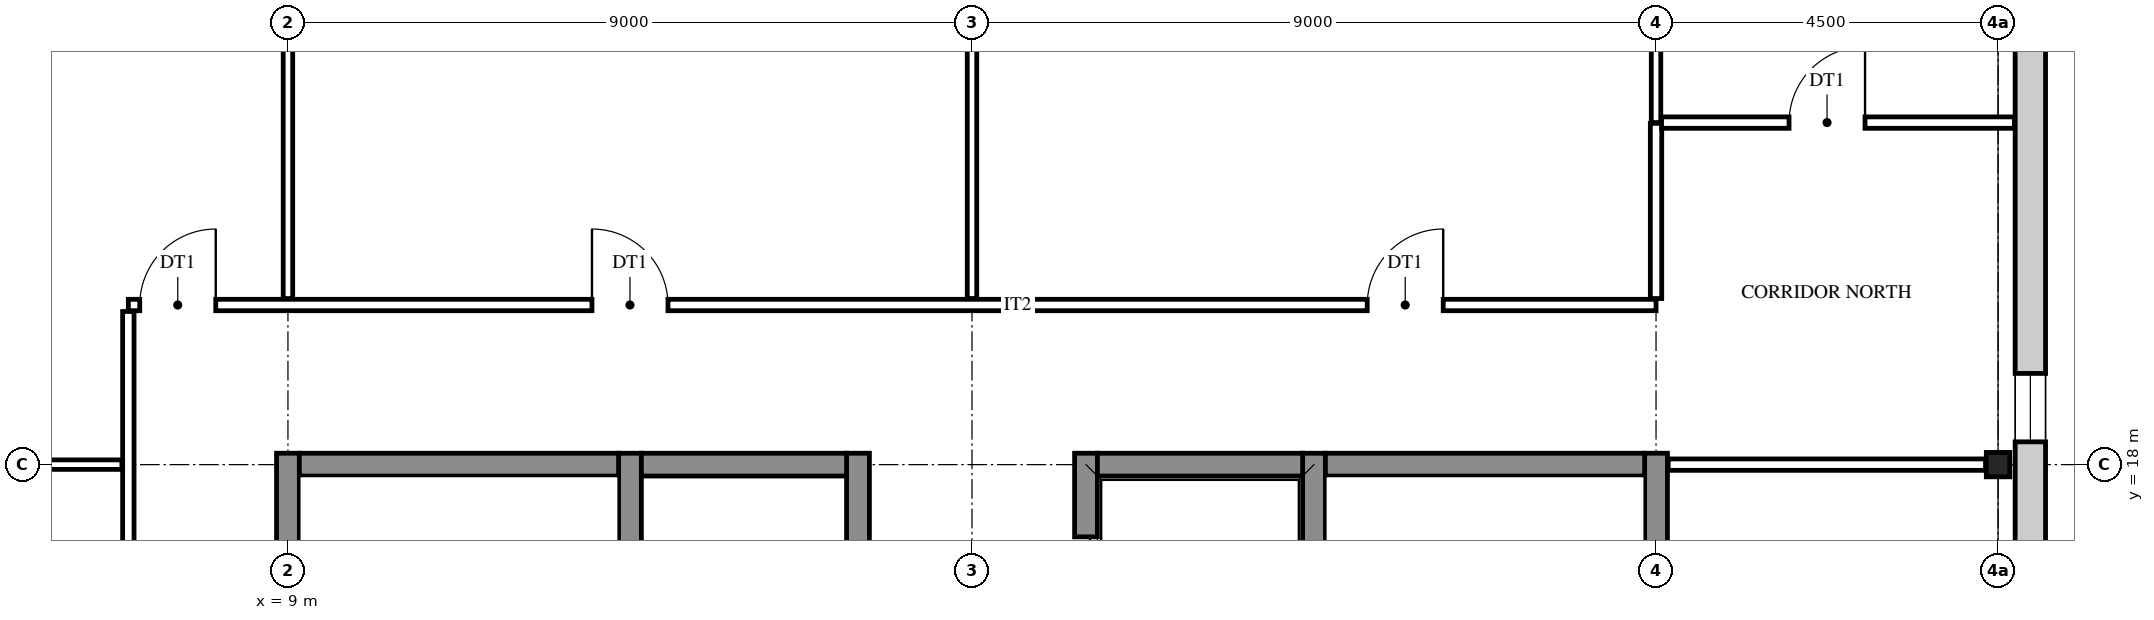
"""IFC4 building model, lengths in metres.
Left out: names, types, materials, properties, quantities, classifications, styles, units other than length and angle.
Written with IfcOpenShell. Run it as: python <this file> out.ifc"""

import sys

from ifc_helpers import new_model, si_unit, direction, frame, frame_2d, origin, origin_2d, place, context, subcontext, project, spatial, rectangle, i_section, extrude, element, fill, save


model = new_model("IFC4")
c1 = context("Model", 3, precision=1e-05, world=origin(), true_north=direction((0.0, 1.0)))
c2 = subcontext(c1, "Body", "Model", "MODEL_VIEW")
j1 = project(units=[si_unit("LENGTHUNIT", "METRE"), si_unit("PLANEANGLEUNIT", "RADIAN")], contexts=[c1])
p1 = place(None, origin())
s1 = spatial("IfcSite", under=j1, at=p1, CompositionType="ELEMENT")
p2 = place(p1, origin())
s2 = spatial("IfcBuilding", under=s1, at=p2, CompositionType="ELEMENT")
p3 = place(p2, frame((0.0, 0.0, 48.6)))
s3 = spatial("IfcBuildingStorey", under=s2, at=p3, CompositionType="ELEMENT", Elevation=48.6)
p4 = place(p3, frame((31.5, 18.0, 0.0), z_axis=(0.0, 0.0, 1.0), x_axis=(1.0, 0.0, 0.0)))
e1 = element("IfcColumn", 1, at=p4, inside=s3, PredefinedType="COLUMN", context=c2, shape_type="SweptSolid", body=[
    extrude(i_section(OverallWidth=0.309, OverallDepth=0.321, WebThickness=0.014, FlangeThickness=0.022, FilletRadius=0.017, at=origin_2d()), origin(), (0.0, 0.0, 1.0), 4.2),
])
for number, where, z_axis, x_axis in (
    (2, (9.0, 8.85, 0.0), (0.0, 0.0, 1.0), (0.0, 1.0, 0.0)),
    (3, (13.5, 8.85, 0.0), (0.0, 0.0, 1.0), (0.0, 1.0, 0.0)),
):
    element("IfcWall", number, at=place(p3, frame(where, z_axis=z_axis, x_axis=x_axis)), inside=s3, PredefinedType="SHEAR", context=c2, shape_type="SweptSolid", body=[
        extrude(rectangle(XDim=9.3, YDim=0.3, at=frame_2d((4.65, 0.0))), origin(), (0.0, 0.0, 1.0), 4.2),
    ])
p5 = place(p3, frame((16.5, 8.85, 0.0), z_axis=(0.0, 0.0, 1.0), x_axis=(0.0, 1.0, 0.0)))
e4 = element("IfcWall", 4, at=p5, inside=s3, PredefinedType="SHEAR", context=c2, shape_type="SweptSolid", body=[
    extrude(rectangle(XDim=9.3, YDim=0.3, at=frame_2d((4.65, 0.0))), origin(), (0.0, 0.0, 1.0), 4.2),
])
p6 = place(p5, frame((1.1, 0.0, 0.0)))
e5 = element("IfcOpeningElement", 5, at=p6, cuts=e4, PredefinedType="OPENING", context=c2, shape_type="SweptSolid", body=[
    extrude(rectangle(XDim=1.1, YDim=2.1, at=frame_2d((0.55, 1.05))), frame((0.0, 0.16, 0.0), z_axis=(0.0, -1.0, 0.0), x_axis=(1.0, 0.0, 0.0)), (0.0, 0.0, 1.0), 0.32),
])
p7 = place(p5, frame((4.1, 0.0, 0.0)))
e6 = element("IfcOpeningElement", 6, at=p7, cuts=e4, PredefinedType="OPENING", context=c2, shape_type="SweptSolid", body=[
    extrude(rectangle(XDim=1.1, YDim=2.1, at=frame_2d((0.55, 1.05))), frame((0.0, 0.16, 0.0), z_axis=(0.0, -1.0, 0.0), x_axis=(1.0, 0.0, 0.0)), (0.0, 0.0, 1.0), 0.32),
])
p8 = place(p3, frame((19.5, 8.85, 0.0), z_axis=(0.0, 0.0, 1.0), x_axis=(0.0, 1.0, 0.0)))
e7 = element("IfcWall", 7, at=p8, inside=s3, PredefinedType="SHEAR", context=c2, shape_type="SweptSolid", body=[
    extrude(rectangle(XDim=9.3, YDim=0.3, at=frame_2d((4.65, 0.0))), origin(), (0.0, 0.0, 1.0), 4.2),
])
p9 = place(p8, frame((3.95, 0.0, 0.0)))
e8 = element("IfcOpeningElement", 8, at=p9, cuts=e7, PredefinedType="OPENING", context=c2, shape_type="SweptSolid", body=[
    extrude(rectangle(XDim=1.4, YDim=2.1, at=frame_2d((0.7, 1.05))), frame((0.0, 0.16, 0.0), z_axis=(0.0, -1.0, 0.0), x_axis=(1.0, 0.0, 0.0)), (0.0, 0.0, 1.0), 0.32),
])
p10 = place(p8, frame((7.1, 0.0, 0.0)))
e9 = element("IfcOpeningElement", 9, at=p10, cuts=e7, PredefinedType="OPENING", context=c2, shape_type="SweptSolid", body=[
    extrude(rectangle(XDim=1.1, YDim=2.1, at=frame_2d((0.55, 1.05))), frame((0.0, 0.16, 0.0), z_axis=(0.0, -1.0, 0.0), x_axis=(1.0, 0.0, 0.0)), (0.0, 0.0, 1.0), 0.32),
])
for number, where, z_axis, x_axis in (
    (10, (22.5, 8.85, 0.0), (0.0, 0.0, 1.0), (0.0, 1.0, 0.0)),
    (11, (27.0, 8.85, 0.0), (0.0, 0.0, 1.0), (0.0, 1.0, 0.0)),
):
    element("IfcWall", number, at=place(p3, frame(where, z_axis=z_axis, x_axis=x_axis)), inside=s3, PredefinedType="SHEAR", context=c2, shape_type="SweptSolid", body=[
        extrude(rectangle(XDim=9.3, YDim=0.3, at=frame_2d((4.65, 0.0))), origin(), (0.0, 0.0, 1.0), 4.2),
    ])
p11 = place(p3, frame((9.15, 18.0, 0.0), z_axis=(0.0, 0.0, 1.0), x_axis=(1.0, 0.0, 0.0)))
e12 = element("IfcWall", 12, at=p11, inside=s3, PredefinedType="SHEAR", context=c2, shape_type="SweptSolid", body=[
    extrude(rectangle(XDim=4.2, YDim=0.3, at=frame_2d((2.1, 0.0))), origin(), (0.0, 0.0, 1.0), 4.2),
])
for number, where, z_axis, x_axis in (
    (13, (13.65, 18.0, 0.0), (0.0, 0.0, 1.0), (1.0, 0.0, 0.0)),
    (14, (19.65, 18.0, 0.0), (0.0, 0.0, 1.0), (1.0, 0.0, 0.0)),
):
    element("IfcWall", number, at=place(p3, frame(where, z_axis=z_axis, x_axis=x_axis)), inside=s3, PredefinedType="SHEAR", context=c2, shape_type="SweptSolid", body=[
        extrude(rectangle(XDim=2.7, YDim=0.3, at=frame_2d((1.35, 0.0))), origin(), (0.0, 0.0, 1.0), 4.2),
    ])
p12 = place(p3, frame((22.65, 18.0, 0.0), z_axis=(0.0, 0.0, 1.0), x_axis=(1.0, 0.0, 0.0)))
e15 = element("IfcWall", 15, at=p12, inside=s3, PredefinedType="SHEAR", context=c2, shape_type="SweptSolid", body=[
    extrude(rectangle(XDim=4.2, YDim=0.3, at=frame_2d((2.1, 0.0))), origin(), (0.0, 0.0, 1.0), 4.2),
])
p13 = place(p3, frame((31.925, 27.225, 0.0), z_axis=(0.0, 0.0, 1.0), x_axis=(0.0, -1.0, 0.0)))
e16 = element("IfcWall", 16, at=p13, inside=s3, PredefinedType="STANDARD", context=c2, shape_type="SweptSolid", body=[
    extrude(rectangle(XDim=27.45, YDim=0.4, at=frame_2d((13.725, 0.0))), origin(), (0.0, 0.0, 1.0), 4.2),
])
p14 = place(p13, frame((26.025, 0.0, 0.9)))
e17 = element("IfcOpeningElement", 17, at=p14, cuts=e16, PredefinedType="OPENING", context=c2, shape_type="SweptSolid", body=[
    extrude(rectangle(XDim=0.9, YDim=2.0, at=frame_2d((0.45, 1.0))), frame((0.0, 0.21, 0.0), z_axis=(0.0, -1.0, 0.0), x_axis=(1.0, 0.0, 0.0)), (0.0, 0.0, 1.0), 0.42),
])
p15 = place(p13, frame((18.525, 0.0, 0.9)))
e18 = element("IfcOpeningElement", 18, at=p15, cuts=e16, PredefinedType="OPENING", context=c2, shape_type="SweptSolid", body=[
    extrude(rectangle(XDim=0.9, YDim=2.0, at=frame_2d((0.45, 1.0))), frame((0.0, 0.21, 0.0), z_axis=(0.0, -1.0, 0.0), x_axis=(1.0, 0.0, 0.0)), (0.0, 0.0, 1.0), 0.42),
])
p16 = place(p13, frame((15.675, 0.0, 1.6)))
e19 = element("IfcOpeningElement", 19, at=p16, cuts=e16, PredefinedType="OPENING", context=c2, shape_type="SweptSolid", body=[
    extrude(rectangle(XDim=0.6, YDim=0.9, at=frame_2d((0.3, 0.45))), frame((0.0, 0.21, 0.0), z_axis=(0.0, -1.0, 0.0), x_axis=(1.0, 0.0, 0.0)), (0.0, 0.0, 1.0), 0.42),
])
p17 = place(p13, frame((11.175, 0.0, 1.6)))
e20 = element("IfcOpeningElement", 20, at=p17, cuts=e16, PredefinedType="OPENING", context=c2, shape_type="SweptSolid", body=[
    extrude(rectangle(XDim=0.6, YDim=0.9, at=frame_2d((0.3, 0.45))), frame((0.0, 0.21, 0.0), z_axis=(0.0, -1.0, 0.0), x_axis=(1.0, 0.0, 0.0)), (0.0, 0.0, 1.0), 0.42),
])
p18 = place(p13, frame((8.025, 0.0, 0.9)))
e21 = element("IfcOpeningElement", 21, at=p18, cuts=e16, PredefinedType="OPENING", context=c2, shape_type="SweptSolid", body=[
    extrude(rectangle(XDim=0.9, YDim=2.0, at=frame_2d((0.45, 1.0))), frame((0.0, 0.21, 0.0), z_axis=(0.0, -1.0, 0.0), x_axis=(1.0, 0.0, 0.0)), (0.0, 0.0, 1.0), 0.42),
])
p19 = place(p13, frame((0.525, 0.0, 0.9)))
e22 = element("IfcOpeningElement", 22, at=p19, cuts=e16, PredefinedType="OPENING", context=c2, shape_type="SweptSolid", body=[
    extrude(rectangle(XDim=0.9, YDim=2.0, at=frame_2d((0.45, 1.0))), frame((0.0, 0.21, 0.0), z_axis=(0.0, -1.0, 0.0), x_axis=(1.0, 0.0, 0.0)), (0.0, 0.0, 1.0), 0.42),
])
p20 = place(p3, frame((6.9, 6.985, 0.0), z_axis=(0.0, 0.0, 1.0), x_axis=(0.0, 1.0, 0.0)))
e23 = element("IfcWall", 23, at=p20, inside=s3, PredefinedType="PARTITIONING", context=c2, shape_type="SweptSolid", body=[
    extrude(rectangle(XDim=13.03, YDim=0.15, at=frame_2d((6.515, 0.0))), origin(), (0.0, 0.0, 1.0), 3.542),
])
p21 = place(p20, frame((5.965, 0.0, 0.0)))
e24 = element("IfcOpeningElement", 24, at=p21, cuts=e23, PredefinedType="OPENING", context=c2, shape_type="SweptSolid", body=[
    extrude(rectangle(XDim=1.1, YDim=2.1, at=frame_2d((0.55, 1.05))), frame((0.0, 0.085, 0.0), z_axis=(0.0, -1.0, 0.0), x_axis=(1.0, 0.0, 0.0)), (0.0, 0.0, 1.0), 0.17),
])
for number, where, z_axis, x_axis in (
    (25, (9.0, 20.185, 0.0), (0.0, 0.0, 1.0), (0.0, 1.0, 0.0)),
    (26, (18.0, 20.185, 0.0), (0.0, 0.0, 1.0), (0.0, 1.0, 0.0)),
):
    element("IfcWall", number, at=place(p3, frame(where, z_axis=z_axis, x_axis=x_axis)), inside=s3, PredefinedType="PARTITIONING", context=c2, shape_type="SweptSolid", body=[
        extrude(rectangle(XDim=6.645, YDim=0.125, at=frame_2d((3.322, 0.0))), origin(), (0.0, 0.0, 1.0), 3.542),
    ])
p22 = place(p3, frame((27.0, 20.185, 0.0), z_axis=(0.0, 0.0, 1.0), x_axis=(0.0, 1.0, 0.0)))
e27 = element("IfcWall", 27, at=p22, inside=s3, PredefinedType="PARTITIONING", context=c2, shape_type="SweptSolid", body=[
    extrude(rectangle(XDim=2.305, YDim=0.15, at=frame_2d((1.152, 0.0))), origin(), (0.0, 0.0, 1.0), 3.542),
])
p23 = place(p3, frame((27.0, 22.5, 0.0), z_axis=(0.0, 0.0, 1.0), x_axis=(0.0, 1.0, 0.0)))
e28 = element("IfcWall", 28, at=p23, inside=s3, PredefinedType="PARTITIONING", context=c2, shape_type="SweptSolid", body=[
    extrude(rectangle(XDim=4.33, YDim=0.125, at=frame_2d((2.165, 0.0))), origin(), (0.0, 0.0, 1.0), 3.542),
])
p24 = place(p3, frame((0.165, 18.0, 0.0), z_axis=(0.0, 0.0, 1.0), x_axis=(1.0, 0.0, 0.0)))
e29 = element("IfcWall", 29, at=p24, inside=s3, PredefinedType="PARTITIONING", context=c2, shape_type="SweptSolid", body=[
    extrude(rectangle(XDim=6.65, YDim=0.125, at=frame_2d((3.325, 0.0))), origin(), (0.0, 0.0, 1.0), 3.542),
])
p25 = place(p3, frame((27.16, 18.0, 0.0), z_axis=(0.0, 0.0, 1.0), x_axis=(1.0, 0.0, 0.0)))
e30 = element("IfcWall", 30, at=p25, inside=s3, PredefinedType="PARTITIONING", context=c2, shape_type="SweptSolid", body=[
    extrude(rectangle(XDim=4.176, YDim=0.15, at=frame_2d((2.088, 0.0))), origin(), (0.0, 0.0, 1.0), 3.542),
])
p26 = place(p3, frame((6.9, 20.1, 0.0), z_axis=(0.0, 0.0, 1.0), x_axis=(1.0, 0.0, 0.0)))
e31 = element("IfcWall", 31, at=p26, inside=s3, PredefinedType="PARTITIONING", context=c2, shape_type="SweptSolid", body=[
    extrude(rectangle(XDim=20.1, YDim=0.15, at=frame_2d((10.05, 0.0))), origin(), (0.0, 0.0, 1.0), 3.542),
])
p27 = place(p26, frame((0.15, 0.0, 0.0)))
e32 = element("IfcOpeningElement", 32, at=p27, cuts=e31, PredefinedType="OPENING", context=c2, shape_type="SweptSolid", body=[
    extrude(rectangle(XDim=1.0, YDim=2.1, at=frame_2d((0.5, 1.05))), frame((0.0, 0.085, 0.0), z_axis=(0.0, -1.0, 0.0), x_axis=(1.0, 0.0, 0.0)), (0.0, 0.0, 1.0), 0.17),
])
p28 = place(p26, frame((6.1, 0.0, 0.0)))
e33 = element("IfcOpeningElement", 33, at=p28, cuts=e31, PredefinedType="OPENING", context=c2, shape_type="SweptSolid", body=[
    extrude(rectangle(XDim=1.0, YDim=2.1, at=frame_2d((0.5, 1.05))), frame((0.0, 0.085, 0.0), z_axis=(0.0, -1.0, 0.0), x_axis=(1.0, 0.0, 0.0)), (0.0, 0.0, 1.0), 0.17),
])
p29 = place(p26, frame((16.3, 0.0, 0.0)))
e34 = element("IfcOpeningElement", 34, at=p29, cuts=e31, PredefinedType="OPENING", context=c2, shape_type="SweptSolid", body=[
    extrude(rectangle(XDim=1.0, YDim=2.1, at=frame_2d((0.5, 1.05))), frame((0.0, 0.085, 0.0), z_axis=(0.0, -1.0, 0.0), x_axis=(1.0, 0.0, 0.0)), (0.0, 0.0, 1.0), 0.17),
])
p30 = place(p3, frame((27.073, 22.5, 0.0), z_axis=(0.0, 0.0, 1.0), x_axis=(1.0, 0.0, 0.0)))
e35 = element("IfcWall", 35, at=p30, inside=s3, PredefinedType="PARTITIONING", context=c2, shape_type="SweptSolid", body=[
    extrude(rectangle(XDim=4.643, YDim=0.15, at=frame_2d((2.321, 0.0))), origin(), (0.0, 0.0, 1.0), 3.542),
])
p31 = place(p30, frame((1.677, 0.0, 0.0)))
e36 = element("IfcOpeningElement", 36, at=p31, cuts=e35, PredefinedType="OPENING", context=c2, shape_type="SweptSolid", body=[
    extrude(rectangle(XDim=1.0, YDim=2.1, at=frame_2d((0.5, 1.05))), frame((0.0, 0.085, 0.0), z_axis=(0.0, -1.0, 0.0), x_axis=(1.0, 0.0, 0.0)), (0.0, 0.0, 1.0), 0.17),
])
p32 = place(p18, origin())
e37 = element("IfcWindow", 37, at=p32, inside=s3, PartitioningType="SINGLE_PANEL", PredefinedType="WINDOW", context=c2, shape_type="SweptSolid", body=[
    extrude(rectangle(XDim=0.9, YDim=2.0, at=frame_2d((0.45, 1.0))), frame((0.0, 0.03, 0.0), z_axis=(0.0, -1.0, 0.0), x_axis=(1.0, 0.0, 0.0)), (0.0, 0.0, 1.0), 0.06),
])
fill(e21, e37)
p33 = place(p27, origin())
e38 = element("IfcDoor", 38, at=p33, inside=s3, OperationType="SINGLE_SWING_RIGHT", PredefinedType="DOOR", context=c2, shape_type="SweptSolid", body=[
    extrude(rectangle(XDim=1.0, YDim=2.1, at=frame_2d((0.5, 1.05))), frame((0.0, 0.025, 0.0), z_axis=(0.0, -1.0, 0.0), x_axis=(1.0, 0.0, 0.0)), (0.0, 0.0, 1.0), 0.05),
])
fill(e32, e38)
p34 = place(p28, origin())
e39 = element("IfcDoor", 39, at=p34, inside=s3, OperationType="SINGLE_SWING_LEFT", PredefinedType="DOOR", context=c2, shape_type="SweptSolid", body=[
    extrude(rectangle(XDim=1.0, YDim=2.1, at=frame_2d((0.5, 1.05))), frame((0.0, 0.025, 0.0), z_axis=(0.0, -1.0, 0.0), x_axis=(1.0, 0.0, 0.0)), (0.0, 0.0, 1.0), 0.05),
])
fill(e33, e39)
p35 = place(p29, origin())
e40 = element("IfcDoor", 40, at=p35, inside=s3, OperationType="SINGLE_SWING_RIGHT", PredefinedType="DOOR", context=c2, shape_type="SweptSolid", body=[
    extrude(rectangle(XDim=1.0, YDim=2.1, at=frame_2d((0.5, 1.05))), frame((0.0, 0.025, 0.0), z_axis=(0.0, -1.0, 0.0), x_axis=(1.0, 0.0, 0.0)), (0.0, 0.0, 1.0), 0.05),
])
fill(e34, e40)
p36 = place(p31, origin())
e41 = element("IfcDoor", 41, at=p36, inside=s3, OperationType="SINGLE_SWING_RIGHT", PredefinedType="DOOR", context=c2, shape_type="SweptSolid", body=[
    extrude(rectangle(XDim=1.0, YDim=2.1, at=frame_2d((0.5, 1.05))), frame((0.0, 0.025, 0.0), z_axis=(0.0, -1.0, 0.0), x_axis=(1.0, 0.0, 0.0)), (0.0, 0.0, 1.0), 0.05),
])
fill(e36, e41)
p37 = place(p10, origin())
e42 = element("IfcDoor", 42, at=p37, inside=s3, OperationType="DOUBLE_DOOR_SLIDING", PredefinedType="DOOR", context=c2, shape_type="SweptSolid", body=[
    extrude(rectangle(XDim=1.1, YDim=2.1, at=frame_2d((0.55, 1.05))), frame((0.0, 0.025, 0.0), z_axis=(0.0, -1.0, 0.0), x_axis=(1.0, 0.0, 0.0)), (0.0, 0.0, 1.0), 0.05),
])
fill(e9, e42)
save(model, sys.argv[1])
